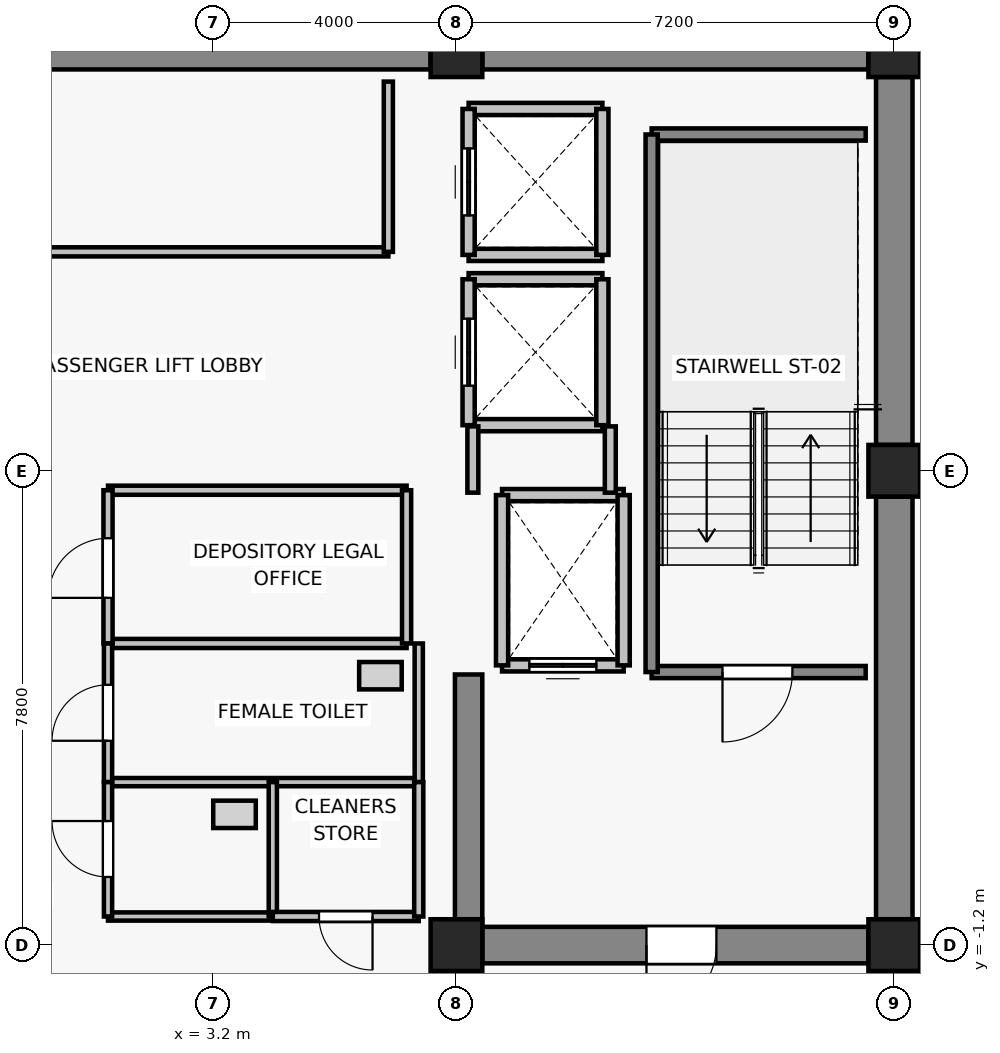
"""IFC4 building model, lengths in metres.
Left out: names, types, materials, properties, quantities, classifications, styles, units other than length and angle.
Written with IfcOpenShell. Run it as: python <this file> out.ifc"""

import sys

from ifc_helpers import new_model, si_unit, direction, frame, frame_2d, origin, origin_2d, place, context, subcontext, project, spatial, rectangle, extrude, source, transform, mapped, element, fill, save


model = new_model("IFC4")
c1 = context("Model", 3, precision=1e-05, world=origin(), true_north=direction((0.0, 1.0)))
c2 = subcontext(c1, "Body", "Model", "MODEL_VIEW")
j1 = project(units=[si_unit("LENGTHUNIT", "METRE"), si_unit("PLANEANGLEUNIT", "RADIAN")], contexts=[c1])
p1 = place(None, origin())
s1 = spatial("IfcSite", under=j1, at=p1, CompositionType="ELEMENT")
p2 = place(p1, origin())
s2 = spatial("IfcBuilding", under=s1, at=p2, CompositionType="ELEMENT")
p3 = place(p2, frame((0.0, 0.0, 251.8)))
s3 = spatial("IfcBuildingStorey", under=s2, at=p3, CompositionType="ELEMENT", Elevation=251.8)
for number, where, z_axis, x_axis in (
    (1, (7.2, -1.2, 0.0), (0.0, 0.0, 1.0), (1.0, 0.0, 0.0)),
    (2, (14.4, -1.2, 0.0), (0.0, 0.0, 1.0), (1.0, 0.0, 0.0)),
    (3, (14.4, 6.6, 0.0), (0.0, 0.0, 1.0), (1.0, 0.0, 0.0)),
    (4, (7.2, 13.5, 0.0), (0.0, 0.0, 1.0), (1.0, 0.0, 0.0)),
    (5, (14.4, 13.5, 0.0), (0.0, 0.0, 1.0), (1.0, 0.0, 0.0)),
):
    element("IfcColumn", number, at=place(p3, frame(where, z_axis=z_axis, x_axis=x_axis)), inside=s3, PredefinedType="COLUMN", context=c2, shape_type="SweptSolid", body=[
        extrude(rectangle(XDim=0.85, YDim=0.85, at=origin_2d()), origin(), (0.0, 0.0, 1.0), 3.3),
    ])
p4 = place(p3, frame((-6.775, 13.5, 0.0), z_axis=(0.0, 0.0, 1.0), x_axis=(1.0, 0.0, 0.0)))
e6 = element("IfcWall", 6, at=p4, inside=s3, PredefinedType="SHEAR", context=c2, shape_type="SweptSolid", body=[
    extrude(rectangle(XDim=13.55, YDim=0.6, at=frame_2d((6.775, 0.0))), origin(), (0.0, 0.0, 1.0), 3.075),
])
p5 = place(p3, frame((7.625, 13.5, 0.0), z_axis=(0.0, 0.0, 1.0), x_axis=(1.0, 0.0, 0.0)))
e7 = element("IfcWall", 7, at=p5, inside=s3, PredefinedType="SHEAR", context=c2, shape_type="SweptSolid", body=[
    extrude(rectangle(XDim=6.35, YDim=0.6, at=frame_2d((3.175, 0.0))), origin(), (0.0, 0.0, 1.0), 3.075),
])
p6 = place(p3, frame((14.4, -0.775, 0.0), z_axis=(0.0, 0.0, 1.0), x_axis=(0.0, 1.0, 0.0)))
e8 = element("IfcWall", 8, at=p6, inside=s3, PredefinedType="SHEAR", context=c2, shape_type="SweptSolid", body=[
    extrude(rectangle(XDim=6.95, YDim=0.6, at=frame_2d((3.475, 0.0))), origin(), (0.0, 0.0, 1.0), 3.075),
])
p7 = place(p3, frame((14.4, 7.025, 0.0), z_axis=(0.0, 0.0, 1.0), x_axis=(0.0, 1.0, 0.0)))
e9 = element("IfcWall", 9, at=p7, inside=s3, PredefinedType="SHEAR", context=c2, shape_type="SweptSolid", body=[
    extrude(rectangle(XDim=6.05, YDim=0.6, at=frame_2d((3.025, 0.0))), origin(), (0.0, 0.0, 1.0), 3.075),
])
p8 = place(p3, frame((13.975, -1.2, 0.0), z_axis=(0.0, 0.0, 1.0), x_axis=(-1.0, 0.0, 0.0)))
e10 = element("IfcWall", 10, at=p8, inside=s3, PredefinedType="SHEAR", context=c2, shape_type="SweptSolid", body=[
    extrude(rectangle(XDim=6.35, YDim=0.6, at=frame_2d((3.175, 0.0))), origin(), (0.0, 0.0, 1.0), 3.075),
])
p9 = place(p8, frame((2.5, 0.0, 0.0)))
e11 = element("IfcOpeningElement", 11, at=p9, cuts=e10, PredefinedType="OPENING", context=c2, shape_type="SweptSolid", body=[
    extrude(rectangle(XDim=1.15, YDim=2.15, at=frame_2d((0.575, 1.075))), frame((0.0, 0.31, 0.0), z_axis=(0.0, -1.0, 0.0), x_axis=(1.0, 0.0, 0.0)), (0.0, 0.0, 1.0), 0.62),
])
p10 = place(p3, frame((7.4, -0.9, 0.0), z_axis=(0.0, 0.0, 1.0), x_axis=(0.0, 1.0, 0.0)))
e12 = element("IfcWall", 12, at=p10, inside=s3, PredefinedType="SHEAR", context=c2, shape_type="SweptSolid", body=[
    extrude(rectangle(XDim=4.15, YDim=0.45, at=frame_2d((2.075, 0.0))), origin(), (0.0, 0.0, 1.0), 3.075),
])
p11 = place(p3, frame((9.95, 3.4, 0.0), z_axis=(0.0, 0.0, 1.0), x_axis=(-1.0, 0.0, 0.0)))
e13 = element("IfcWall", 13, at=p11, inside=s3, PredefinedType="SOLIDWALL", context=c2, shape_type="SweptSolid", body=[
    extrude(rectangle(XDim=2.0, YDim=0.2, at=frame_2d((1.0, 0.0))), origin(), (0.0, 0.0, 1.0), 3.075),
])
p12 = place(p11, frame((0.45, 0.0, 0.0)))
e14 = element("IfcOpeningElement", 14, at=p12, cuts=e13, PredefinedType="OPENING", context=c2, shape_type="SweptSolid", body=[
    extrude(rectangle(XDim=1.1, YDim=2.2, at=frame_2d((0.55, 1.1))), frame((0.0, 0.11, 0.0), z_axis=(0.0, -1.0, 0.0), x_axis=(1.0, 0.0, 0.0)), (0.0, 0.0, 1.0), 0.22),
])
p13 = place(p3, frame((7.95, 6.2, 0.0), z_axis=(0.0, 0.0, 1.0), x_axis=(1.0, 0.0, 0.0)))
e15 = element("IfcWall", 15, at=p13, inside=s3, PredefinedType="SOLIDWALL", context=c2, shape_type="SweptSolid", body=[
    extrude(rectangle(XDim=2.0, YDim=0.2, at=frame_2d((1.0, 0.0))), origin(), (0.0, 0.0, 1.0), 3.075),
])
for number, where, z_axis, x_axis in (
    (16, (7.95, 3.4, 0.0), (0.0, 0.0, 1.0), (0.0, 1.0, 0.0)),
    (17, (9.95, 6.2, 0.0), (0.0, 0.0, 1.0), (0.0, -1.0, 0.0)),
):
    element("IfcWall", number, at=place(p3, frame(where, z_axis=z_axis, x_axis=x_axis)), inside=s3, PredefinedType="SOLIDWALL", context=c2, shape_type="SweptSolid", body=[
        extrude(rectangle(XDim=2.8, YDim=0.2, at=frame_2d((1.4, 0.0))), origin(), (0.0, 0.0, 1.0), 3.075),
    ])
for number, where, z_axis, x_axis in (
    (18, (9.6, 7.35, 0.0), (0.0, 0.0, 1.0), (-1.0, 0.0, 0.0)),
    (19, (7.4, 9.75, 0.0), (0.0, 0.0, 1.0), (1.0, 0.0, 0.0)),
):
    element("IfcWall", number, at=place(p3, frame(where, z_axis=z_axis, x_axis=x_axis)), inside=s3, PredefinedType="SOLIDWALL", context=c2, shape_type="SweptSolid", body=[
        extrude(rectangle(XDim=2.2, YDim=0.2, at=frame_2d((1.1, 0.0))), origin(), (0.0, 0.0, 1.0), 2.615),
    ])
p14 = place(p3, frame((7.4, 7.35, 0.0), z_axis=(0.0, 0.0, 1.0), x_axis=(0.0, 1.0, 0.0)))
e20 = element("IfcWall", 20, at=p14, inside=s3, PredefinedType="SOLIDWALL", context=c2, shape_type="SweptSolid", body=[
    extrude(rectangle(XDim=2.4, YDim=0.2, at=frame_2d((1.2, 0.0))), origin(), (0.0, 0.0, 1.0), 2.615),
])
p15 = place(p14, frame((0.65, 0.0, 0.0)))
e21 = element("IfcOpeningElement", 21, at=p15, cuts=e20, PredefinedType="OPENING", context=c2, shape_type="SweptSolid", body=[
    extrude(rectangle(XDim=1.1, YDim=2.2, at=frame_2d((0.55, 1.1))), frame((0.0, 0.11, 0.0), z_axis=(0.0, -1.0, 0.0), x_axis=(1.0, 0.0, 0.0)), (0.0, 0.0, 1.0), 0.22),
])
p16 = place(p3, frame((9.6, 9.75, 0.0), z_axis=(0.0, 0.0, 1.0), x_axis=(0.0, -1.0, 0.0)))
e22 = element("IfcWall", 22, at=p16, inside=s3, PredefinedType="SOLIDWALL", context=c2, shape_type="SweptSolid", body=[
    extrude(rectangle(XDim=2.4, YDim=0.2, at=frame_2d((1.2, 0.0))), origin(), (0.0, 0.0, 1.0), 3.075),
])
for number, where, z_axis, x_axis in (
    (23, (9.6, 10.15, 0.0), (0.0, 0.0, 1.0), (-1.0, 0.0, 0.0)),
    (24, (7.4, 12.55, 0.0), (0.0, 0.0, 1.0), (1.0, 0.0, 0.0)),
):
    element("IfcWall", number, at=place(p3, frame(where, z_axis=z_axis, x_axis=x_axis)), inside=s3, PredefinedType="SOLIDWALL", context=c2, shape_type="SweptSolid", body=[
        extrude(rectangle(XDim=2.2, YDim=0.2, at=frame_2d((1.1, 0.0))), origin(), (0.0, 0.0, 1.0), 2.615),
    ])
p17 = place(p3, frame((7.4, 10.15, 0.0), z_axis=(0.0, 0.0, 1.0), x_axis=(0.0, 1.0, 0.0)))
e25 = element("IfcWall", 25, at=p17, inside=s3, PredefinedType="SOLIDWALL", context=c2, shape_type="SweptSolid", body=[
    extrude(rectangle(XDim=2.4, YDim=0.2, at=frame_2d((1.2, 0.0))), origin(), (0.0, 0.0, 1.0), 2.615),
])
p18 = place(p17, frame((0.65, 0.0, 0.0)))
e26 = element("IfcOpeningElement", 26, at=p18, cuts=e25, PredefinedType="OPENING", context=c2, shape_type="SweptSolid", body=[
    extrude(rectangle(XDim=1.1, YDim=2.2, at=frame_2d((0.55, 1.1))), frame((0.0, 0.11, 0.0), z_axis=(0.0, -1.0, 0.0), x_axis=(1.0, 0.0, 0.0)), (0.0, 0.0, 1.0), 0.22),
])
p19 = place(p3, frame((9.6, 12.55, 0.0), z_axis=(0.0, 0.0, 1.0), x_axis=(0.0, -1.0, 0.0)))
e27 = element("IfcWall", 27, at=p19, inside=s3, PredefinedType="SOLIDWALL", context=c2, shape_type="SweptSolid", body=[
    extrude(rectangle(XDim=2.4, YDim=0.2, at=frame_2d((1.2, 0.0))), origin(), (0.0, 0.0, 1.0), 3.075),
])
p20 = place(p3, frame((13.93, 3.29, 0.0), z_axis=(0.0, 0.0, 1.0), x_axis=(-1.0, 0.0, 0.0)))
e28 = element("IfcWall", 28, at=p20, inside=s3, PredefinedType="SOLIDWALL", context=c2, shape_type="SweptSolid", body=[
    extrude(rectangle(XDim=3.52, YDim=0.2, at=frame_2d((1.76, 0.0))), origin(), (0.0, 0.0, 1.0), 3.075),
])
p21 = place(p20, frame((1.205, 0.0, 0.0)))
e29 = element("IfcOpeningElement", 29, at=p21, cuts=e28, PredefinedType="OPENING", context=c2, shape_type="SweptSolid", body=[
    extrude(rectangle(XDim=1.15, YDim=2.15, at=frame_2d((0.575, 1.075))), frame((0.0, 0.11, 0.0), z_axis=(0.0, -1.0, 0.0), x_axis=(1.0, 0.0, 0.0)), (0.0, 0.0, 1.0), 0.22),
])
p22 = place(p3, frame((10.41, 12.13, 0.0), z_axis=(0.0, 0.0, 1.0), x_axis=(1.0, 0.0, 0.0)))
e30 = element("IfcWall", 30, at=p22, inside=s3, PredefinedType="SOLIDWALL", context=c2, shape_type="SweptSolid", body=[
    extrude(rectangle(XDim=3.52, YDim=0.2, at=frame_2d((1.76, 0.0))), origin(), (0.0, 0.0, 1.0), 3.075),
])
p23 = place(p3, frame((10.41, 3.29, 0.0), z_axis=(0.0, 0.0, 1.0), x_axis=(0.0, 1.0, 0.0)))
e31 = element("IfcWall", 31, at=p23, inside=s3, PredefinedType="SOLIDWALL", context=c2, shape_type="SweptSolid", body=[
    extrude(rectangle(XDim=8.84, YDim=0.2, at=frame_2d((4.42, 0.0))), origin(), (0.0, 0.0, 1.0), 3.075),
])
p24 = place(p3, frame((7.47, 6.24, 0.0), z_axis=(0.0, 0.0, 1.0), x_axis=(0.0, 1.0, 0.0)))
e32 = element("IfcWall", 32, at=p24, inside=s3, PredefinedType="PARTITIONING", context=c2, shape_type="SweptSolid", body=[
    extrude(rectangle(XDim=1.09, YDim=0.18, at=frame_2d((0.545, 0.0))), origin(), (0.0, 0.0, 1.0), 2.615),
])
p25 = place(p3, frame((9.73, 7.33, 0.0), z_axis=(0.0, 0.0, 1.0), x_axis=(0.0, -1.0, 0.0)))
e33 = element("IfcWall", 33, at=p25, inside=s3, PredefinedType="PARTITIONING", context=c2, shape_type="SweptSolid", body=[
    extrude(rectangle(XDim=1.09, YDim=0.18, at=frame_2d((0.545, 0.0))), origin(), (0.0, 0.0, 1.0), 3.075),
])
p26 = place(p3, frame((6.08, 10.2, 0.0), z_axis=(0.0, 0.0, 1.0), x_axis=(-1.0, 0.0, 0.0)))
e34 = element("IfcWall", 34, at=p26, inside=s3, PredefinedType="PARTITIONING", context=c2, shape_type="SweptSolid", body=[
    extrude(rectangle(XDim=12.16, YDim=0.15, at=frame_2d((6.08, 0.0))), origin(), (0.0, 0.0, 1.0), 3.075),
])
p27 = place(p26, frame((7.005, 0.0, 0.0)))
e35 = element("IfcOpeningElement", 35, at=p27, cuts=e34, PredefinedType="OPENING", context=c2, shape_type="SweptSolid", body=[
    extrude(rectangle(XDim=1.15, YDim=2.15, at=frame_2d((0.575, 1.075))), frame((0.0, 0.085, 0.0), z_axis=(0.0, -1.0, 0.0), x_axis=(1.0, 0.0, 0.0)), (0.0, 0.0, 1.0), 0.17),
])
p28 = place(p3, frame((6.08, 13.0, 0.0), z_axis=(0.0, 0.0, 1.0), x_axis=(0.0, -1.0, 0.0)))
e36 = element("IfcWall", 36, at=p28, inside=s3, PredefinedType="PARTITIONING", context=c2, shape_type="SweptSolid", body=[
    extrude(rectangle(XDim=2.8, YDim=0.15, at=frame_2d((1.4, 0.0))), origin(), (0.0, 0.0, 1.0), 3.075),
])
for number, where, z_axis, x_axis in (
    (37, (6.38, 3.76, 0.0), (0.0, 0.0, 1.0), (-1.0, 0.0, 0.0)),
    (38, (1.47, 6.28, 0.0), (0.0, 0.0, 1.0), (1.0, 0.0, 0.0)),
):
    element("IfcWall", number, at=place(p3, frame(where, z_axis=z_axis, x_axis=x_axis)), inside=s3, PredefinedType="PARTITIONING", context=c2, shape_type="SweptSolid", body=[
        extrude(rectangle(XDim=4.91, YDim=0.15, at=frame_2d((2.455, 0.0))), origin(), (0.0, 0.0, 1.0), 3.075),
    ])
p29 = place(p3, frame((1.47, 3.76, 0.0), z_axis=(0.0, 0.0, 1.0), x_axis=(0.0, 1.0, 0.0)))
e39 = element("IfcWall", 39, at=p29, inside=s3, PredefinedType="PARTITIONING", context=c2, shape_type="SweptSolid", body=[
    extrude(rectangle(XDim=2.52, YDim=0.15, at=frame_2d((1.26, 0.0))), origin(), (0.0, 0.0, 1.0), 3.075),
])
p30 = place(p29, frame((0.75, 0.0, 0.0)))
e40 = element("IfcOpeningElement", 40, at=p30, cuts=e39, PredefinedType="OPENING", context=c2, shape_type="SweptSolid", body=[
    extrude(rectangle(XDim=0.98, YDim=2.15, at=frame_2d((0.49, 1.075))), frame((0.0, 0.085, 0.0), z_axis=(0.0, -1.0, 0.0), x_axis=(1.0, 0.0, 0.0)), (0.0, 0.0, 1.0), 0.17),
])
p31 = place(p3, frame((6.38, 6.28, 0.0), z_axis=(0.0, 0.0, 1.0), x_axis=(0.0, -1.0, 0.0)))
e41 = element("IfcWall", 41, at=p31, inside=s3, PredefinedType="PARTITIONING", context=c2, shape_type="SweptSolid", body=[
    extrude(rectangle(XDim=2.52, YDim=0.15, at=frame_2d((1.26, 0.0))), origin(), (0.0, 0.0, 1.0), 3.075),
])
p32 = place(p3, frame((6.58, 1.48, 0.0), z_axis=(0.0, 0.0, 1.0), x_axis=(-1.0, 0.0, 0.0)))
e42 = element("IfcWall", 42, at=p32, inside=s3, PredefinedType="PARTITIONING", context=c2, shape_type="SweptSolid", body=[
    extrude(rectangle(XDim=5.11, YDim=0.135, at=frame_2d((2.555, 0.0))), origin(), (0.0, 0.0, 1.0), 3.075),
])
p33 = place(p3, frame((1.47, 1.48, 0.0), z_axis=(0.0, 0.0, 1.0), x_axis=(0.0, 1.0, 0.0)))
e43 = element("IfcWall", 43, at=p33, inside=s3, PredefinedType="PARTITIONING", context=c2, shape_type="SweptSolid", body=[
    extrude(rectangle(XDim=2.28, YDim=0.135, at=frame_2d((1.14, 0.0))), origin(), (0.0, 0.0, 1.0), 3.075),
])
p34 = place(p33, frame((0.68, 0.0, 0.0)))
e44 = element("IfcOpeningElement", 44, at=p34, cuts=e43, PredefinedType="OPENING", context=c2, shape_type="SweptSolid", body=[
    extrude(rectangle(XDim=0.92, YDim=2.1, at=frame_2d((0.46, 1.05))), frame((0.0, 0.077, 0.0), z_axis=(0.0, -1.0, 0.0), x_axis=(1.0, 0.0, 0.0)), (0.0, 0.0, 1.0), 0.155),
])
p35 = place(p3, frame((6.58, 3.76, 0.0), z_axis=(0.0, 0.0, 1.0), x_axis=(0.0, -1.0, 0.0)))
e45 = element("IfcWall", 45, at=p35, inside=s3, PredefinedType="PARTITIONING", context=c2, shape_type="SweptSolid", body=[
    extrude(rectangle(XDim=2.28, YDim=0.135, at=frame_2d((1.14, 0.0))), origin(), (0.0, 0.0, 1.0), 3.075),
])
p36 = place(p3, frame((4.18, -0.73, 0.0), z_axis=(0.0, 0.0, 1.0), x_axis=(-1.0, 0.0, 0.0)))
e46 = element("IfcWall", 46, at=p36, inside=s3, PredefinedType="PARTITIONING", context=c2, shape_type="SweptSolid", body=[
    extrude(rectangle(XDim=2.71, YDim=0.135, at=frame_2d((1.355, 0.0))), origin(), (0.0, 0.0, 1.0), 3.075),
])
p37 = place(p3, frame((1.47, -0.73, 0.0), z_axis=(0.0, 0.0, 1.0), x_axis=(0.0, 1.0, 0.0)))
e47 = element("IfcWall", 47, at=p37, inside=s3, PredefinedType="PARTITIONING", context=c2, shape_type="SweptSolid", body=[
    extrude(rectangle(XDim=2.21, YDim=0.135, at=frame_2d((1.105, 0.0))), origin(), (0.0, 0.0, 1.0), 3.075),
])
p38 = place(p37, frame((0.65, 0.0, 0.0)))
e48 = element("IfcOpeningElement", 48, at=p38, cuts=e47, PredefinedType="OPENING", context=c2, shape_type="SweptSolid", body=[
    extrude(rectangle(XDim=0.92, YDim=2.1, at=frame_2d((0.46, 1.05))), frame((0.0, 0.077, 0.0), z_axis=(0.0, -1.0, 0.0), x_axis=(1.0, 0.0, 0.0)), (0.0, 0.0, 1.0), 0.155),
])
p39 = place(p3, frame((4.18, 1.48, 0.0), z_axis=(0.0, 0.0, 1.0), x_axis=(0.0, -1.0, 0.0)))
e49 = element("IfcWall", 49, at=p39, inside=s3, PredefinedType="PARTITIONING", context=c2, shape_type="SweptSolid", body=[
    extrude(rectangle(XDim=2.21, YDim=0.135, at=frame_2d((1.105, 0.0))), origin(), (0.0, 0.0, 1.0), 3.075),
])
p40 = place(p3, frame((6.58, -0.73, 0.0), z_axis=(0.0, 0.0, 1.0), x_axis=(-1.0, 0.0, 0.0)))
e50 = element("IfcWall", 50, at=p40, inside=s3, PredefinedType="PARTITIONING", context=c2, shape_type="SweptSolid", body=[
    extrude(rectangle(XDim=2.4, YDim=0.15, at=frame_2d((1.2, 0.0))), origin(), (0.0, 0.0, 1.0), 3.075),
])
p41 = place(p40, frame((0.76, 0.0, 0.0)))
e51 = element("IfcOpeningElement", 51, at=p41, cuts=e50, PredefinedType="OPENING", context=c2, shape_type="SweptSolid", body=[
    extrude(rectangle(XDim=0.88, YDim=2.1, at=frame_2d((0.44, 1.05))), frame((0.0, 0.085, 0.0), z_axis=(0.0, -1.0, 0.0), x_axis=(1.0, 0.0, 0.0)), (0.0, 0.0, 1.0), 0.17),
])
p42 = place(p3, frame((6.58, 1.48, 0.0), z_axis=(0.0, 0.0, 1.0), x_axis=(0.0, -1.0, 0.0)))
e52 = element("IfcWall", 52, at=p42, inside=s3, PredefinedType="PARTITIONING", context=c2, shape_type="SweptSolid", body=[
    extrude(rectangle(XDim=2.21, YDim=0.15, at=frame_2d((1.105, 0.0))), origin(), (0.0, 0.0, 1.0), 3.075),
])
m1 = source(origin(), c2, "Body", "SweptSolid", [
    extrude(rectangle(XDim=1.1, YDim=2.2, at=frame_2d((0.55, 1.1))), frame((0.0, 0.025, 0.0), z_axis=(0.0, -1.0, 0.0), x_axis=(1.0, 0.0, 0.0)), (0.0, 0.0, 1.0), 0.05),
])
p43 = place(p12, origin())
e53 = element("IfcDoor", 53, at=p43, inside=s3, OperationType="DOUBLE_DOOR_SLIDING", PredefinedType="DOOR", context=c2, shape_type="MappedRepresentation", body=[
    mapped(m1, transform((0.0, 0.0, 0.0), x_axis=(1.0, 0.0, 0.0), y_axis=(0.0, 1.0, 0.0), z_axis=(0.0, 0.0, 1.0), scale=1.0)),
])
fill(e14, e53)
p44 = place(p15, origin())
e54 = element("IfcDoor", 54, at=p44, inside=s3, OperationType="DOUBLE_DOOR_SLIDING", PredefinedType="DOOR", context=c2, shape_type="MappedRepresentation", body=[
    mapped(m1, transform((0.0, 0.0, 0.0), x_axis=(1.0, 0.0, 0.0), y_axis=(0.0, 1.0, 0.0), z_axis=(0.0, 0.0, 1.0), scale=1.0)),
])
fill(e21, e54)
p45 = place(p18, origin())
e55 = element("IfcDoor", 55, at=p45, inside=s3, OperationType="DOUBLE_DOOR_SLIDING", PredefinedType="DOOR", context=c2, shape_type="MappedRepresentation", body=[
    mapped(m1, transform((0.0, 0.0, 0.0), x_axis=(1.0, 0.0, 0.0), y_axis=(0.0, 1.0, 0.0), z_axis=(0.0, 0.0, 1.0), scale=1.0)),
])
fill(e26, e55)
m2 = source(origin(), c2, "Body", "SweptSolid", [
    extrude(rectangle(XDim=1.15, YDim=2.15, at=frame_2d((0.575, 1.075))), frame((0.0, 0.025, 0.0), z_axis=(0.0, -1.0, 0.0), x_axis=(1.0, 0.0, 0.0)), (0.0, 0.0, 1.0), 0.05),
])
p46 = place(p21, origin())
e56 = element("IfcDoor", 56, at=p46, inside=s3, OperationType="SINGLE_SWING_RIGHT", PredefinedType="DOOR", context=c2, shape_type="MappedRepresentation", body=[
    mapped(m2, transform((0.0, 0.0, 0.0), x_axis=(1.0, 0.0, 0.0), y_axis=(0.0, 1.0, 0.0), z_axis=(0.0, 0.0, 1.0), scale=1.0)),
])
fill(e29, e56)
p47 = place(p9, origin())
e57 = element("IfcDoor", 57, at=p47, inside=s3, OperationType="SINGLE_SWING_RIGHT", PredefinedType="DOOR", context=c2, shape_type="MappedRepresentation", body=[
    mapped(m2, transform((0.0, 0.0, 0.0), x_axis=(1.0, 0.0, 0.0), y_axis=(0.0, 1.0, 0.0), z_axis=(0.0, 0.0, 1.0), scale=1.0)),
])
fill(e11, e57)
m3 = source(origin(), c2, "Body", "SweptSolid", [
    extrude(rectangle(XDim=0.98, YDim=2.15, at=frame_2d((0.49, 1.075))), frame((0.0, 0.025, 0.0), z_axis=(0.0, -1.0, 0.0), x_axis=(1.0, 0.0, 0.0)), (0.0, 0.0, 1.0), 0.05),
])
p48 = place(p30, origin())
e58 = element("IfcDoor", 58, at=p48, inside=s3, OperationType="SINGLE_SWING_LEFT", PredefinedType="DOOR", context=c2, shape_type="MappedRepresentation", body=[
    mapped(m3, transform((0.0, 0.0, 0.0), x_axis=(1.0, 0.0, 0.0), y_axis=(0.0, 1.0, 0.0), z_axis=(0.0, 0.0, 1.0), scale=1.0)),
])
fill(e40, e58)
m4 = source(origin(), c2, "Body", "SweptSolid", [
    extrude(rectangle(XDim=0.92, YDim=2.1, at=frame_2d((0.46, 1.05))), frame((0.0, 0.025, 0.0), z_axis=(0.0, -1.0, 0.0), x_axis=(1.0, 0.0, 0.0)), (0.0, 0.0, 1.0), 0.05),
])
p49 = place(p34, origin())
e59 = element("IfcDoor", 59, at=p49, inside=s3, OperationType="SINGLE_SWING_LEFT", PredefinedType="DOOR", context=c2, shape_type="MappedRepresentation", body=[
    mapped(m4, transform((0.0, 0.0, 0.0), x_axis=(1.0, 0.0, 0.0), y_axis=(0.0, 1.0, 0.0), z_axis=(0.0, 0.0, 1.0), scale=1.0)),
])
fill(e44, e59)
p50 = place(p38, origin())
e60 = element("IfcDoor", 60, at=p50, inside=s3, OperationType="SINGLE_SWING_RIGHT", PredefinedType="DOOR", context=c2, shape_type="MappedRepresentation", body=[
    mapped(m4, transform((0.0, 0.0, 0.0), x_axis=(1.0, 0.0, 0.0), y_axis=(0.0, 1.0, 0.0), z_axis=(0.0, 0.0, 1.0), scale=1.0)),
])
fill(e48, e60)
m5 = source(origin(), c2, "Body", "SweptSolid", [
    extrude(rectangle(XDim=0.88, YDim=2.1, at=frame_2d((0.44, 1.05))), frame((0.0, 0.025, 0.0), z_axis=(0.0, -1.0, 0.0), x_axis=(1.0, 0.0, 0.0)), (0.0, 0.0, 1.0), 0.05),
])
p51 = place(p41, origin())
e61 = element("IfcDoor", 61, at=p51, inside=s3, OperationType="SINGLE_SWING_LEFT", PredefinedType="DOOR", context=c2, shape_type="MappedRepresentation", body=[
    mapped(m5, transform((0.0, 0.0, 0.0), x_axis=(1.0, 0.0, 0.0), y_axis=(0.0, 1.0, 0.0), z_axis=(0.0, 0.0, 1.0), scale=1.0)),
])
fill(e51, e61)
save(model, sys.argv[1])
